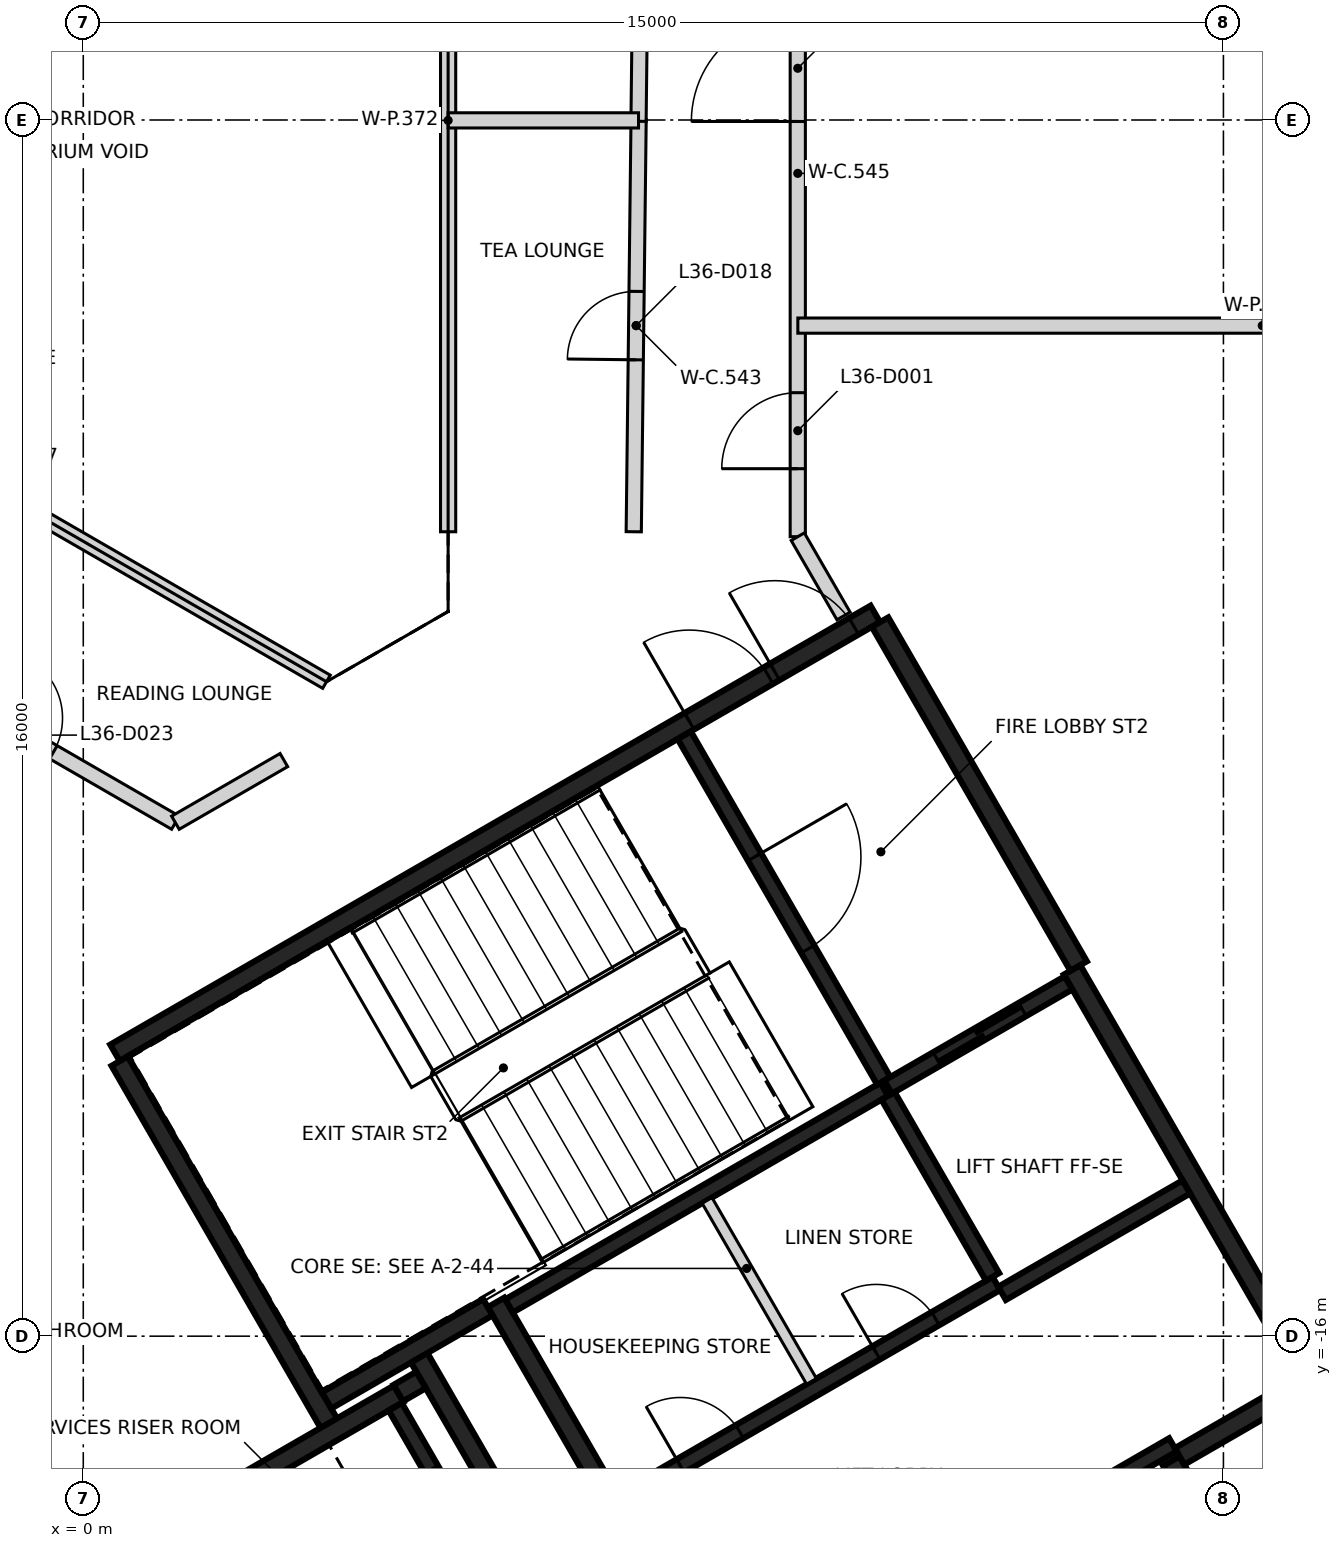
"""IFC4 building model, lengths in metres.
Left out: names, types, materials, properties, quantities, classifications, styles, units other than length and angle.
Written with IfcOpenShell. Run it as: python <this file> out.ifc"""

import sys

from ifc_helpers import new_model, si_unit, direction, frame, frame_2d, origin, place, context, subcontext, project, spatial, rectangle, extrude, element, fill, save


model = new_model("IFC4")
c1 = context("Model", 3, precision=1e-05, world=origin(), true_north=direction((0.0, 1.0)))
c2 = subcontext(c1, "Body", "Model", "MODEL_VIEW")
j1 = project(units=[si_unit("LENGTHUNIT", "METRE"), si_unit("PLANEANGLEUNIT", "RADIAN")], contexts=[c1])
p1 = place(None, origin())
s1 = spatial("IfcSite", under=j1, at=p1, CompositionType="ELEMENT")
p2 = place(p1, origin())
s2 = spatial("IfcBuilding", under=s1, at=p2, CompositionType="ELEMENT")
p3 = place(p2, frame((0.0, 0.0, 146.8)))
s3 = spatial("IfcBuildingStorey", under=s2, at=p3, CompositionType="ELEMENT", Elevation=146.8)
p4 = place(p3, frame((0.417, -12.273, 0.0), z_axis=(0.0, 0.0, 1.0), x_axis=(0.866021906294, 0.500006057782, 0.0)))
e1 = element("IfcWall", 1, at=p4, inside=s3, PredefinedType="SHEAR", context=c2, shape_type="SweptSolid", body=[
    extrude(rectangle(XDim=11.55, YDim=0.25, at=frame_2d((5.775, 0.0))), origin(), (0.0, 0.0, 1.0), 3.2),
])
p5 = place(p4, frame((10.025, 0.0, 0.0)))
e2 = element("IfcOpeningElement", 2, at=p5, cuts=e1, PredefinedType="OPENING", context=c2, shape_type="SweptSolid", body=[
    extrude(rectangle(XDim=1.2, YDim=2.1, at=frame_2d((0.6, 1.05))), frame((0.0, 0.135, 0.0), z_axis=(0.0, -1.0, 0.0), x_axis=(1.0, 0.0, 0.0)), (0.0, 0.0, 1.0), 0.27),
])
p6 = place(p4, frame((8.725, 0.0, 0.0)))
e3 = element("IfcOpeningElement", 3, at=p6, cuts=e1, PredefinedType="OPENING", context=c2, shape_type="SweptSolid", body=[
    extrude(rectangle(XDim=1.2, YDim=2.1, at=frame_2d((0.6, 1.05))), frame((0.0, 0.135, 0.0), z_axis=(0.0, -1.0, 0.0), x_axis=(1.0, 0.0, 0.0)), (0.0, 0.0, 1.0), 0.27),
])
p7 = place(p3, frame((13.008, -11.181, 0.0), z_axis=(0.0, 0.0, 1.0), x_axis=(0.500004234368, -0.866022959057, 0.0)))
e4 = element("IfcWall", 4, at=p7, inside=s3, PredefinedType="SHEAR", context=c2, shape_type="SweptSolid", body=[
    extrude(rectangle(XDim=6.25, YDim=0.25, at=frame_2d((3.125, 0.0))), origin(), (0.0, 0.0, 1.0), 3.2),
])
p8 = place(p3, frame((3.235, -17.153, 0.0), z_axis=(0.0, 0.0, 1.0), x_axis=(-0.500008851346, 0.866020293397, 0.0)))
e5 = element("IfcWall", 5, at=p8, inside=s3, PredefinedType="SHEAR", context=c2, shape_type="SweptSolid", body=[
    extrude(rectangle(XDim=5.51, YDim=0.25, at=frame_2d((2.755, 0.0))), origin(), (0.0, 0.0, 1.0), 3.2),
])
p9 = place(p3, frame((10.483, -6.606, 0.0), z_axis=(0.0, 0.0, 1.0), x_axis=(0.49999885962, -0.866026062182, 0.0)))
e6 = element("IfcWall", 6, at=p9, inside=s3, PredefinedType="SHEAR", context=c2, shape_type="SweptSolid", body=[
    extrude(rectangle(XDim=5.225, YDim=0.25, at=frame_2d((2.612, 0.0))), origin(), (0.0, 0.0, 1.0), 3.2),
])
p10 = place(p3, frame((7.031, -18.327, 0.0), z_axis=(0.0, 0.0, 1.0), x_axis=(-0.499971222258, 0.866042017984, 0.0)))
e7 = element("IfcWall", 7, at=p10, inside=s3, PredefinedType="SHEAR", context=c2, shape_type="SweptSolid", body=[
    extrude(rectangle(XDim=3.2, YDim=0.25, at=frame_2d((1.6, 0.0))), origin(), (0.0, 0.0, 1.0), 3.2),
])
p11 = place(p3, frame((14.315, -17.644, 0.0), z_axis=(0.0, 0.0, 1.0), x_axis=(0.500023226632, -0.866011993467, 0.0)))
e8 = element("IfcWall", 8, at=p11, inside=s3, PredefinedType="SHEAR", context=c2, shape_type="SweptSolid", body=[
    extrude(rectangle(XDim=2.974, YDim=0.25, at=frame_2d((1.487, 0.0))), origin(), (0.0, 0.0, 1.0), 3.2),
])
p12 = place(p3, frame((1.669, -18.19, 0.0), z_axis=(0.0, 0.0, 1.0), x_axis=(0.866042235819, 0.499970844928, 0.0)))
e9 = element("IfcWall", 9, at=p12, inside=s3, PredefinedType="SHEAR", context=c2, shape_type="SweptSolid", body=[
    extrude(rectangle(XDim=2.865, YDim=0.25, at=frame_2d((1.432, 0.0))), origin(), (0.0, 0.0, 1.0), 3.2),
])
p13 = place(p3, frame((4.414, -16.276, 0.0), z_axis=(0.0, 0.0, 1.0), x_axis=(0.500003324108, -0.866023484601, 0.0)))
e10 = element("IfcWall", 10, at=p13, inside=s3, PredefinedType="SHEAR", context=c2, shape_type="SweptSolid", body=[
    extrude(rectangle(XDim=3.085, YDim=0.25, at=frame_2d((1.542, 0.0))), origin(), (0.0, 0.0, 1.0), 3.2),
])
p14 = place(p3, frame((5.322, -15.619, 0.0), z_axis=(0.0, 0.0, 1.0), x_axis=(-0.866026229868, -0.499998569178, 0.0)))
e11 = element("IfcWall", 11, at=p14, inside=s3, PredefinedType="SHEAR", context=c2, shape_type="SweptSolid", body=[
    extrude(rectangle(XDim=2.449, YDim=0.25, at=frame_2d((1.225, 0.0))), origin(), (0.0, 0.0, 1.0), 3.2),
])
p15 = place(p3, frame((16.025, -16.656, 0.0), z_axis=(0.0, 0.0, 1.0), x_axis=(-0.866016279763, -0.500015802937, 0.0)))
e12 = element("IfcWall", 12, at=p15, inside=s3, PredefinedType="SHEAR", context=c2, shape_type="SweptSolid", body=[
    extrude(rectangle(XDim=1.849, YDim=0.25, at=frame_2d((0.925, 0.0))), origin(), (0.0, 0.0, 1.0), 3.2),
])
p16 = place(p3, frame((4.145, -16.749, 0.0), z_axis=(0.0, 0.0, 1.0), x_axis=(0.866185586049, 0.49972245349, 0.0)))
e13 = element("IfcWall", 13, at=p16, inside=s3, PredefinedType="SHEAR", context=c2, shape_type="SweptSolid", body=[
    extrude(rectangle(XDim=0.344, YDim=0.25, at=frame_2d((0.172, 0.0))), origin(), (0.0, 0.0, 1.0), 3.2),
])
p17 = place(p3, frame((9.052, -20.48, 0.0), z_axis=(0.0, 0.0, 1.0), x_axis=(0.866030299012, 0.499991521122, 0.0)))
e14 = element("IfcWall", 14, at=p17, inside=s3, PredefinedType="SHEAR", context=c2, shape_type="SweptSolid", body=[
    extrude(rectangle(XDim=6.1, YDim=0.2, at=frame_2d((3.05, 0.0))), origin(), (0.0, 0.0, 1.0), 3.2),
])
p18 = place(p17, frame((1.0, 0.0, 0.0)))
e15 = element("IfcOpeningElement", 15, at=p18, cuts=e14, PredefinedType="OPENING", context=c2, shape_type="SweptSolid", body=[
    extrude(rectangle(XDim=1.2, YDim=2.1, at=frame_2d((0.6, 1.05))), frame((0.0, 0.11, 0.0), z_axis=(0.0, -1.0, 0.0), x_axis=(1.0, 0.0, 0.0)), (0.0, 0.0, 1.0), 0.22),
])
p19 = place(p17, frame((4.05, 0.0, 0.0)))
e16 = element("IfcOpeningElement", 16, at=p19, cuts=e14, PredefinedType="OPENING", context=c2, shape_type="SweptSolid", body=[
    extrude(rectangle(XDim=1.2, YDim=2.1, at=frame_2d((0.6, 1.05))), frame((0.0, 0.11, 0.0), z_axis=(0.0, -1.0, 0.0), x_axis=(1.0, 0.0, 0.0)), (0.0, 0.0, 1.0), 0.22),
])
p20 = place(p3, frame((10.538, -12.752, 0.0), z_axis=(0.0, 0.0, 1.0), x_axis=(-0.866038630372, -0.499977090179, 0.0)))
e17 = element("IfcWall", 17, at=p20, inside=s3, PredefinedType="SHEAR", context=c2, shape_type="SweptSolid", body=[
    extrude(rectangle(XDim=5.699, YDim=0.2, at=frame_2d((2.85, 0.0))), origin(), (0.0, 0.0, 1.0), 3.2),
])
p21 = place(p3, frame((7.077, -18.156, 0.0), z_axis=(0.0, 0.0, 1.0), x_axis=(0.866038630372, 0.499977090179, 0.0)))
e18 = element("IfcWall", 18, at=p21, inside=s3, PredefinedType="SHEAR", context=c2, shape_type="SweptSolid", body=[
    extrude(rectangle(XDim=5.699, YDim=0.2, at=frame_2d((2.85, 0.0))), origin(), (0.0, 0.0, 1.0), 3.2),
])
p22 = place(p21, frame((0.899, 0.0, 0.0)))
e19 = element("IfcOpeningElement", 19, at=p22, cuts=e18, PredefinedType="OPENING", context=c2, shape_type="SweptSolid", body=[
    extrude(rectangle(XDim=0.9, YDim=2.1, at=frame_2d((0.45, 1.05))), frame((0.0, 0.11, 0.0), z_axis=(0.0, -1.0, 0.0), x_axis=(1.0, 0.0, 0.0)), (0.0, 0.0, 1.0), 0.22),
])
p23 = place(p21, frame((3.874, 0.0, 0.0)))
e20 = element("IfcOpeningElement", 20, at=p23, cuts=e18, PredefinedType="OPENING", context=c2, shape_type="SweptSolid", body=[
    extrude(rectangle(XDim=0.9, YDim=2.1, at=frame_2d((0.45, 1.05))), frame((0.0, 0.11, 0.0), z_axis=(0.0, -1.0, 0.0), x_axis=(1.0, 0.0, 0.0)), (0.0, 0.0, 1.0), 0.22),
])
p24 = place(p3, frame((7.906, -8.094, 0.0), z_axis=(0.0, 0.0, 1.0), x_axis=(0.500024287448, -0.866011380966, 0.0)))
e21 = element("IfcWall", 21, at=p24, inside=s3, PredefinedType="SHEAR", context=c2, shape_type="SweptSolid", body=[
    extrude(rectangle(XDim=5.251, YDim=0.2, at=frame_2d((2.625, 0.0))), origin(), (0.0, 0.0, 1.0), 3.2),
])
p25 = place(p24, frame((1.849, 0.0, 0.0)))
e22 = element("IfcOpeningElement", 22, at=p25, cuts=e21, PredefinedType="OPENING", context=c2, shape_type="SweptSolid", body=[
    extrude(rectangle(XDim=1.4, YDim=2.1, at=frame_2d((0.7, 1.05))), frame((0.0, 0.11, 0.0), z_axis=(0.0, -1.0, 0.0), x_axis=(1.0, 0.0, 0.0)), (0.0, 0.0, 1.0), 0.22),
])
p26 = place(p3, frame((5.503, -19.352, 0.0), z_axis=(0.0, 0.0, 1.0), x_axis=(-0.499986818241, 0.866033014143, 0.0)))
e23 = element("IfcWall", 23, at=p26, inside=s3, PredefinedType="SHEAR", context=c2, shape_type="SweptSolid", body=[
    extrude(rectangle(XDim=2.798, YDim=0.2, at=frame_2d((1.399, 0.0))), origin(), (0.0, 0.0, 1.0), 3.2),
])
p27 = place(p26, frame((0.949, 0.0, 0.0)))
e24 = element("IfcOpeningElement", 24, at=p27, cuts=e23, PredefinedType="OPENING", context=c2, shape_type="SweptSolid", body=[
    extrude(rectangle(XDim=0.9, YDim=2.1, at=frame_2d((0.45, 1.05))), frame((0.0, 0.11, 0.0), z_axis=(0.0, -1.0, 0.0), x_axis=(1.0, 0.0, 0.0)), (0.0, 0.0, 1.0), 0.22),
])
p28 = place(p3, frame((11.963, -15.22, 0.0), z_axis=(0.0, 0.0, 1.0), x_axis=(-0.500034990121, 0.866005201286, 0.0)))
e25 = element("IfcWall", 25, at=p28, inside=s3, PredefinedType="SHEAR", context=c2, shape_type="SweptSolid", body=[
    extrude(rectangle(XDim=2.75, YDim=0.2, at=frame_2d((1.375, 0.0))), origin(), (0.0, 0.0, 1.0), 3.2),
])
p29 = place(p3, frame((10.587, -12.723, 0.0), z_axis=(0.0, 0.0, 1.0), x_axis=(0.866037306777, 0.499979382845, 0.0)))
e26 = element("IfcWall", 26, at=p29, inside=s3, PredefinedType="SHEAR", context=c2, shape_type="SweptSolid", body=[
    extrude(rectangle(XDim=2.742, YDim=0.2, at=frame_2d((1.371, 0.0))), origin(), (0.0, 0.0, 1.0), 3.2),
])
p30 = place(p29, frame((0.743, 0.0, 0.0)))
e27 = element("IfcOpeningElement", 27, at=p30, cuts=e26, PredefinedType="OPENING", context=c2, shape_type="SweptSolid", body=[
    extrude(rectangle(XDim=1.3, YDim=2.1, at=frame_2d((0.65, 1.05))), frame((0.0, 0.11, 0.0), z_axis=(0.0, -1.0, 0.0), x_axis=(1.0, 0.0, 0.0)), (0.0, 0.0, 1.0), 0.22),
])
p31 = place(p3, frame((14.512, -14.037, 0.0), z_axis=(0.0, 0.0, 1.0), x_axis=(-0.866044696403, -0.499966582715, 0.0)))
e28 = element("IfcWall", 28, at=p31, inside=s3, PredefinedType="SHEAR", context=c2, shape_type="SweptSolid", body=[
    extrude(rectangle(XDim=2.799, YDim=0.2, at=frame_2d((1.399, 0.0))), origin(), (0.0, 0.0, 1.0), 3.2),
])
p32 = place(p3, frame((8.207, -14.214, 0.0), z_axis=(0.0, 0.0, 1.0), x_axis=(0.50002746344, -0.86600954718, 0.0)))
e29 = element("IfcWall", 29, at=p32, inside=s3, PredefinedType="PARTITIONING", context=c2, shape_type="SweptSolid", body=[
    extrude(rectangle(XDim=2.748, YDim=0.15, at=frame_2d((1.374, 0.0))), origin(), (0.0, 0.0, 1.0), 3.2),
])
p33 = place(p3, frame((-7.455, -4.24, 0.0), z_axis=(0.0, 0.0, 1.0), x_axis=(0.866015783746, -0.500016662025, 0.0)))
e30 = element("IfcWall", 30, at=p33, inside=s3, PredefinedType="PARTITIONING", context=c2, shape_type="SweptSolid", body=[
    extrude(rectangle(XDim=10.009, YDim=0.2, at=frame_2d((5.004, 0.0))), origin(), (0.0, 0.0, 1.0), 3.2),
])
p34 = place(p33, frame((2.262, 0.0, 0.0)))
e31 = element("IfcOpeningElement", 31, at=p34, cuts=e30, PredefinedType="OPENING", context=c2, shape_type="SweptSolid", body=[
    extrude(rectangle(XDim=0.9, YDim=2.1, at=frame_2d((0.45, 1.05))), frame((0.0, 0.11, 0.0), z_axis=(0.0, -1.0, 0.0), x_axis=(1.0, 0.0, 0.0)), (0.0, 0.0, 1.0), 0.22),
])
p35 = place(p33, frame((7.254, 0.0, 0.0)))
e32 = element("IfcOpeningElement", 32, at=p35, cuts=e30, PredefinedType="OPENING", context=c2, shape_type="SweptSolid", body=[
    extrude(rectangle(XDim=0.9, YDim=2.1, at=frame_2d((0.45, 1.05))), frame((0.0, 0.11, 0.0), z_axis=(0.0, -1.0, 0.0), x_axis=(1.0, 0.0, 0.0)), (0.0, 0.0, 1.0), 0.22),
])
p36 = place(p3, frame((1.212, -9.245, 0.0), z_axis=(0.0, 0.0, 1.0), x_axis=(0.86593636949, 0.500154180222, 0.0)))
e33 = element("IfcWall", 33, at=p36, inside=s3, PredefinedType="PARTITIONING", context=c2, shape_type="SweptSolid", body=[
    extrude(rectangle(XDim=1.648, YDim=0.2, at=frame_2d((0.824, 0.0))), origin(), (0.0, 0.0, 1.0), 3.2),
])
p37 = place(p3, frame((7.242, -5.417, 0.0), z_axis=(0.0, 0.0, 1.0), x_axis=(0.01179195138, 0.999930472524, 0.0)))
e34 = element("IfcWall", 34, at=p37, inside=s3, PredefinedType="PARTITIONING", context=c2, shape_type="SweptSolid", body=[
    extrude(rectangle(XDim=5.425, YDim=0.2, at=frame_2d((2.712, 0.0))), origin(), (0.0, 0.0, 1.0), 3.2),
])
p38 = place(p37, frame((2.262, 0.0, 0.0)))
e35 = element("IfcOpeningElement", 35, at=p38, cuts=e34, PredefinedType="OPENING", context=c2, shape_type="SweptSolid", body=[
    extrude(rectangle(XDim=0.9, YDim=2.1, at=frame_2d((0.45, 1.05))), frame((0.0, 0.11, 0.0), z_axis=(0.0, -1.0, 0.0), x_axis=(1.0, 0.0, 0.0)), (0.0, 0.0, 1.0), 0.22),
])
p39 = place(p3, frame((7.305, -0.017, 0.0), z_axis=(0.0, 0.0, 1.0), x_axis=(0.01179195138, 0.999930472524, 0.0)))
e36 = element("IfcWall", 36, at=p39, inside=s3, PredefinedType="PARTITIONING", context=c2, shape_type="SweptSolid", body=[
    extrude(rectangle(XDim=5.425, YDim=0.2, at=frame_2d((2.712, 0.0))), origin(), (0.0, 0.0, 1.0), 3.2),
])
p40 = place(p39, frame((2.262, 0.0, 0.0)))
e37 = element("IfcOpeningElement", 37, at=p40, cuts=e36, PredefinedType="OPENING", context=c2, shape_type="SweptSolid", body=[
    extrude(rectangle(XDim=0.9, YDim=2.1, at=frame_2d((0.45, 1.05))), frame((0.0, 0.11, 0.0), z_axis=(0.0, -1.0, 0.0), x_axis=(1.0, 0.0, 0.0)), (0.0, 0.0, 1.0), 0.22),
])
p41 = place(p3, frame((9.4, -5.482, 0.0), z_axis=(0.0, 0.0, 1.0), x_axis=(0.0, 1.0, 0.0)))
e38 = element("IfcWall", 38, at=p41, inside=s3, PredefinedType="PARTITIONING", context=c2, shape_type="SweptSolid", body=[
    extrude(rectangle(XDim=9.56, YDim=0.2, at=frame_2d((4.78, 0.0))), origin(), (0.0, 0.0, 1.0), 3.2),
])
p42 = place(p41, frame((0.895, 0.0, 0.0)))
e39 = element("IfcOpeningElement", 39, at=p42, cuts=e38, PredefinedType="OPENING", context=c2, shape_type="SweptSolid", body=[
    extrude(rectangle(XDim=1.0, YDim=2.1, at=frame_2d((0.5, 1.05))), frame((0.0, 0.11, 0.0), z_axis=(0.0, -1.0, 0.0), x_axis=(1.0, 0.0, 0.0)), (0.0, 0.0, 1.0), 0.22),
])
p43 = place(p41, frame((5.462, 0.0, 0.0)))
e40 = element("IfcOpeningElement", 40, at=p43, cuts=e38, PredefinedType="OPENING", context=c2, shape_type="SweptSolid", body=[
    extrude(rectangle(XDim=1.4, YDim=2.1, at=frame_2d((0.7, 1.05))), frame((0.0, 0.11, 0.0), z_axis=(0.0, -1.0, 0.0), x_axis=(1.0, 0.0, 0.0)), (0.0, 0.0, 1.0), 0.22),
])
p44 = place(p3, frame((9.4, -5.482, 0.0), z_axis=(0.0, 0.0, 1.0), x_axis=(0.499909562097, -0.866077611837, 0.0)))
e41 = element("IfcWall", 41, at=p44, inside=s3, PredefinedType="PARTITIONING", context=c2, shape_type="SweptSolid", body=[
    extrude(rectangle(XDim=1.205, YDim=0.2, at=frame_2d((0.603, 0.0))), origin(), (0.0, 0.0, 1.0), 3.2),
])
p45 = place(p3, frame((-6.155, -1.989, 0.0), z_axis=(0.0, 0.0, 1.0), x_axis=(0.866009062299, -0.500028303215, 0.0)))
e42 = element("IfcWall", 42, at=p45, inside=s3, PredefinedType="PARTITIONING", context=c2, shape_type="SweptSolid", body=[
    extrude(rectangle(XDim=10.802, YDim=0.2, at=frame_2d((5.401, 0.0))), origin(), (0.0, 0.0, 1.0), 2.3),
])
p46 = place(p3, frame((4.8, -5.417, 0.0), z_axis=(0.0, 0.0, 1.0), x_axis=(0.0, 1.0, 0.0)))
e43 = element("IfcWall", 43, at=p46, inside=s3, PredefinedType="PARTITIONING", context=c2, shape_type="SweptSolid", body=[
    extrude(rectangle(XDim=10.824, YDim=0.2, at=frame_2d((5.412, 0.0))), origin(), (0.0, 0.0, 1.0), 2.3),
])
p47 = place(p3, frame((4.8, -0.005, 0.0), z_axis=(0.0, 0.0, 1.0), x_axis=(1.0, 0.0, 0.0)))
e44 = element("IfcWall", 44, at=p47, inside=s3, PredefinedType="PARTITIONING", context=c2, shape_type="SweptSolid", body=[
    extrude(rectangle(XDim=2.505, YDim=0.2, at=frame_2d((1.252, 0.0))), origin(), (0.0, 0.0, 1.0), 2.3),
])
p48 = place(p3, frame((9.401, -2.705, 0.0), z_axis=(0.0, 0.0, 1.0), x_axis=(1.0, 0.0, 0.0)))
e45 = element("IfcWall", 45, at=p48, inside=s3, PredefinedType="PARTITIONING", context=c2, shape_type="SweptSolid", body=[
    extrude(rectangle(XDim=12.219, YDim=0.2, at=frame_2d((6.11, 0.0))), origin(), (0.0, 0.0, 1.0), 2.3),
])
p49 = place(p30, origin())
e46 = element("IfcDoor", 46, at=p49, inside=s3, OperationType="SLIDING_TO_LEFT", PredefinedType="DOOR", context=c2, shape_type="SweptSolid", body=[
    extrude(rectangle(XDim=1.3, YDim=2.1, at=frame_2d((0.65, 1.05))), frame((0.0, 0.025, 0.0), z_axis=(0.0, -1.0, 0.0), x_axis=(1.0, 0.0, 0.0)), (0.0, 0.0, 1.0), 0.05),
])
fill(e27, e46)
p50 = place(p5, origin())
e47 = element("IfcDoor", 47, at=p50, inside=s3, OperationType="SINGLE_SWING_LEFT", PredefinedType="DOOR", context=c2, shape_type="SweptSolid", body=[
    extrude(rectangle(XDim=1.2, YDim=2.1, at=frame_2d((0.6, 1.05))), frame((0.0, 0.025, 0.0), z_axis=(0.0, -1.0, 0.0), x_axis=(1.0, 0.0, 0.0)), (0.0, 0.0, 1.0), 0.05),
])
fill(e2, e47)
p51 = place(p6, origin())
e48 = element("IfcDoor", 48, at=p51, inside=s3, OperationType="SINGLE_SWING_RIGHT", PredefinedType="DOOR", context=c2, shape_type="SweptSolid", body=[
    extrude(rectangle(XDim=1.2, YDim=2.1, at=frame_2d((0.6, 1.05))), frame((0.0, 0.025, 0.0), z_axis=(0.0, -1.0, 0.0), x_axis=(1.0, 0.0, 0.0)), (0.0, 0.0, 1.0), 0.05),
])
fill(e3, e48)
p52 = place(p25, origin())
e49 = element("IfcDoor", 49, at=p52, inside=s3, OperationType="SINGLE_SWING_LEFT", PredefinedType="DOOR", context=c2, shape_type="SweptSolid", body=[
    extrude(rectangle(XDim=1.4, YDim=2.1, at=frame_2d((0.7, 1.05))), frame((0.0, 0.025, 0.0), z_axis=(0.0, -1.0, 0.0), x_axis=(1.0, 0.0, 0.0)), (0.0, 0.0, 1.0), 0.05),
])
fill(e22, e49)
p53 = place(p22, origin())
e50 = element("IfcDoor", 50, at=p53, inside=s3, OperationType="SINGLE_SWING_RIGHT", PredefinedType="DOOR", context=c2, shape_type="SweptSolid", body=[
    extrude(rectangle(XDim=0.9, YDim=2.1, at=frame_2d((0.45, 1.05))), frame((0.0, 0.025, 0.0), z_axis=(0.0, -1.0, 0.0), x_axis=(1.0, 0.0, 0.0)), (0.0, 0.0, 1.0), 0.05),
])
fill(e19, e50)
p54 = place(p23, origin())
e51 = element("IfcDoor", 51, at=p54, inside=s3, OperationType="SINGLE_SWING_LEFT", PredefinedType="DOOR", context=c2, shape_type="SweptSolid", body=[
    extrude(rectangle(XDim=0.9, YDim=2.1, at=frame_2d((0.45, 1.05))), frame((0.0, 0.025, 0.0), z_axis=(0.0, -1.0, 0.0), x_axis=(1.0, 0.0, 0.0)), (0.0, 0.0, 1.0), 0.05),
])
fill(e20, e51)
p55 = place(p42, frame((1.0, 0.0, 0.0), z_axis=(0.0, 0.0, 1.0), x_axis=(-1.0, 0.0, 0.0)))
e52 = element("IfcDoor", 52, at=p55, inside=s3, OperationType="SINGLE_SWING_LEFT", PredefinedType="DOOR", context=c2, shape_type="SweptSolid", body=[
    extrude(rectangle(XDim=1.0, YDim=2.1, at=frame_2d((0.5, 1.05))), frame((0.0, 0.025, 0.0), z_axis=(0.0, -1.0, 0.0), x_axis=(1.0, 0.0, 0.0)), (0.0, 0.0, 1.0), 0.05),
])
fill(e39, e52)
p56 = place(p43, frame((1.4, 0.0, 0.0), z_axis=(0.0, 0.0, 1.0), x_axis=(-1.0, 0.0, 0.0)))
e53 = element("IfcDoor", 53, at=p56, inside=s3, OperationType="DOUBLE_DOOR_SINGLE_SWING", PredefinedType="DOOR", context=c2, shape_type="SweptSolid", body=[
    extrude(rectangle(XDim=1.4, YDim=2.1, at=frame_2d((0.7, 1.05))), frame((0.0, 0.025, 0.0), z_axis=(0.0, -1.0, 0.0), x_axis=(1.0, 0.0, 0.0)), (0.0, 0.0, 1.0), 0.05),
])
fill(e40, e53)
p57 = place(p38, origin())
e54 = element("IfcDoor", 54, at=p57, inside=s3, OperationType="SINGLE_SWING_LEFT", PredefinedType="DOOR", context=c2, shape_type="SweptSolid", body=[
    extrude(rectangle(XDim=0.9, YDim=2.1, at=frame_2d((0.45, 1.05))), frame((0.0, 0.025, 0.0), z_axis=(0.0, -1.0, 0.0), x_axis=(1.0, 0.0, 0.0)), (0.0, 0.0, 1.0), 0.05),
])
fill(e35, e54)
p58 = place(p35, origin())
e55 = element("IfcDoor", 55, at=p58, inside=s3, OperationType="SINGLE_SWING_LEFT", PredefinedType="DOOR", context=c2, shape_type="SweptSolid", body=[
    extrude(rectangle(XDim=0.9, YDim=2.1, at=frame_2d((0.45, 1.05))), frame((0.0, 0.025, 0.0), z_axis=(0.0, -1.0, 0.0), x_axis=(1.0, 0.0, 0.0)), (0.0, 0.0, 1.0), 0.05),
])
fill(e32, e55)
save(model, sys.argv[1])
